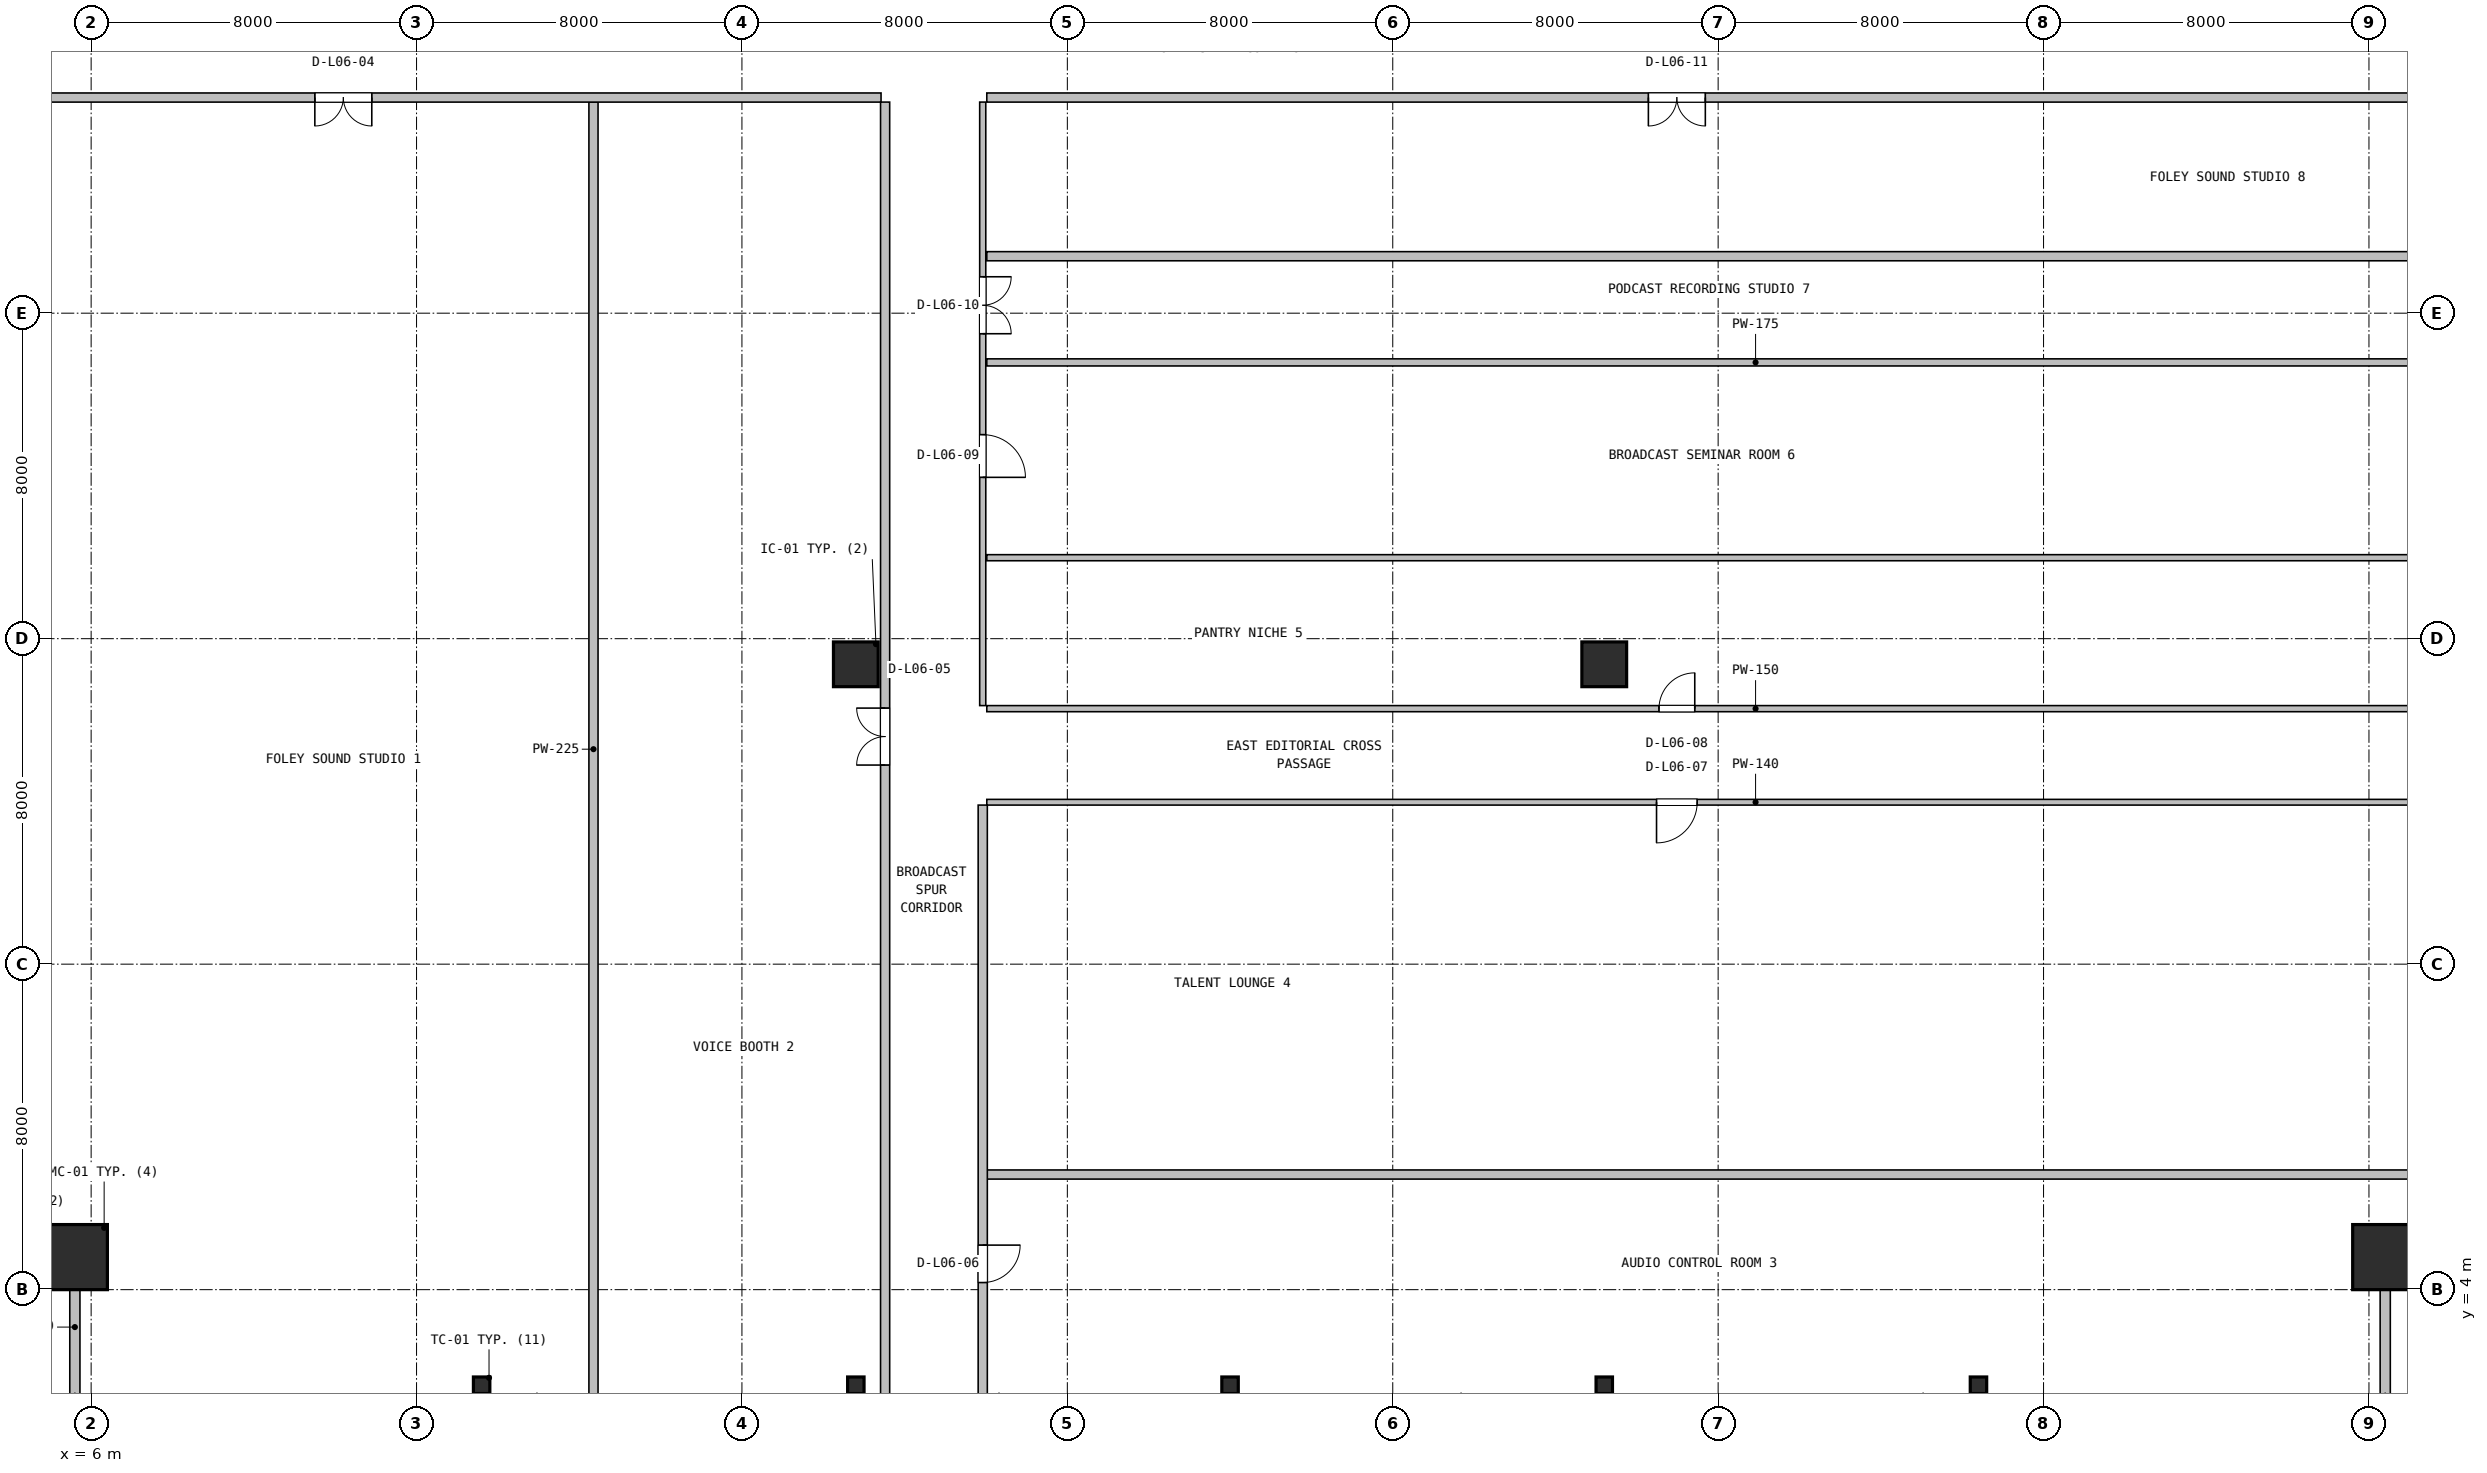
"""IFC4 building model, lengths in metres.
Left out: names, types, materials, properties, quantities, classifications, styles, units other than length and angle.
Written with IfcOpenShell. Run it as: python <this file> out.ifc"""

import sys

from ifc_helpers import new_model, si_unit, direction, frame, frame_2d, origin, origin_2d, place, context, subcontext, project, spatial, rectangle, hollow_rectangle, i_section, extrude, source, transform, mapped, element, fill, save


model = new_model("IFC4")
c1 = context("Model", 3, precision=1e-05, world=origin(), true_north=direction((0.0, 1.0)))
c2 = subcontext(c1, "Body", "Model", "MODEL_VIEW")
j1 = project(units=[si_unit("LENGTHUNIT", "METRE"), si_unit("PLANEANGLEUNIT", "RADIAN")], contexts=[c1])
p1 = place(None, origin())
s1 = spatial("IfcSite", under=j1, at=p1, CompositionType="ELEMENT")
p2 = place(p1, origin())
s2 = spatial("IfcBuilding", under=s1, at=p2, CompositionType="ELEMENT")
p3 = place(p2, frame((0.0, 0.0, 31.5)))
s3 = spatial("IfcBuildingStorey", under=s2, at=p3, CompositionType="ELEMENT", Elevation=31.5)
m1 = source(origin(), c2, "Body", "SweptSolid", [
    extrude(hollow_rectangle(XDim=1.6, YDim=1.6, WallThickness=0.06, at=origin_2d()), origin(), (0.0, 0.0, 1.0), 3.9),
])
for number, where, z_axis, x_axis in (
    (1, (5.6, 4.8, 0.0), (0.0, 0.0, 1.0), (1.0, 0.0, 0.0)),
    (2, (62.4, 4.8, 0.0), (0.0, 0.0, 1.0), (1.0, 0.0, 0.0)),
):
    element("IfcColumn", number, at=place(p3, frame(where, z_axis=z_axis, x_axis=x_axis)), inside=s3, PredefinedType="COLUMN", context=c2, shape_type="MappedRepresentation", body=[
        mapped(m1, transform((0.0, 0.0, 0.0), x_axis=(1.0, 0.0, 0.0), y_axis=(0.0, 1.0, 0.0), z_axis=(0.0, 0.0, 1.0), scale=1.0)),
    ])
m2 = source(origin(), c2, "Body", "SweptSolid", [
    extrude(i_section(OverallWidth=0.404, OverallDepth=0.407, WebThickness=0.027, FlangeThickness=0.044, FilletRadius=0.018, at=origin_2d()), origin(), (0.0, 0.0, 1.0), 3.9),
])
for number, where, z_axis, x_axis in (
    (3, (15.6, 1.65, 0.0), (0.0, 0.0, 1.0), (1.0, 0.0, 0.0)),
    (4, (24.8, 1.65, 0.0), (0.0, 0.0, 1.0), (1.0, 0.0, 0.0)),
    (5, (34.0, 1.65, 0.0), (0.0, 0.0, 1.0), (1.0, 0.0, 0.0)),
    (6, (43.2, 1.65, 0.0), (0.0, 0.0, 1.0), (1.0, 0.0, 0.0)),
    (7, (52.4, 1.65, 0.0), (0.0, 0.0, 1.0), (1.0, 0.0, 0.0)),
):
    element("IfcColumn", number, at=place(p3, frame(where, z_axis=z_axis, x_axis=x_axis)), inside=s3, PredefinedType="COLUMN", context=c2, shape_type="MappedRepresentation", body=[
        mapped(m2, transform((0.0, 0.0, 0.0), x_axis=(1.0, 0.0, 0.0), y_axis=(0.0, 1.0, 0.0), z_axis=(0.0, 0.0, 1.0), scale=1.0)),
    ])
m3 = source(origin(), c2, "Body", "SweptSolid", [
    extrude(rectangle(XDim=1.1, YDim=1.1, at=origin_2d()), origin(), (0.0, 0.0, 1.0), 3.9),
])
for number, where, z_axis, x_axis in (
    (8, (24.8, 19.37, 0.0), (0.0, 0.0, 1.0), (1.0, 0.0, 0.0)),
    (9, (43.2, 19.37, 0.0), (0.0, 0.0, 1.0), (1.0, 0.0, 0.0)),
):
    element("IfcColumn", number, at=place(p3, frame(where, z_axis=z_axis, x_axis=x_axis)), inside=s3, PredefinedType="COLUMN", context=c2, shape_type="MappedRepresentation", body=[
        mapped(m3, transform((0.0, 0.0, 0.0), x_axis=(1.0, 0.0, 0.0), y_axis=(0.0, 1.0, 0.0), z_axis=(0.0, 0.0, 1.0), scale=1.0)),
    ])
for number, where, z_axis, x_axis in (
    (10, (5.6, 1.28, 0.0), (0.0, 0.0, 1.0), (0.0, 1.0, 0.0)),
    (11, (62.4, 1.28, 0.0), (0.0, 0.0, 1.0), (0.0, 1.0, 0.0)),
):
    element("IfcWall", number, at=place(p3, frame(where, z_axis=z_axis, x_axis=x_axis)), inside=s3, PredefinedType="SOLIDWALL", context=c2, shape_type="SweptSolid", body=[
        extrude(rectangle(XDim=3.6, YDim=0.25, at=frame_2d((1.8, 0.0))), origin(), (0.0, 0.0, 1.0), 3.208),
    ])
p4 = place(p3, frame((18.35, 1.38, 0.0), z_axis=(0.0, 0.0, 1.0), x_axis=(0.0, 1.0, 0.0)))
e12 = element("IfcWall", 12, at=p4, inside=s3, PredefinedType="PARTITIONING", context=c2, shape_type="SweptSolid", body=[
    extrude(rectangle(XDim=31.808, YDim=0.225, at=frame_2d((15.904, 0.0))), origin(), (0.0, 0.0, 1.0), 3.208),
])
p5 = place(p3, frame((2.18, 33.3, 0.0), z_axis=(0.0, 0.0, 1.0), x_axis=(1.0, 0.0, 0.0)))
e13 = element("IfcWall", 13, at=p5, inside=s3, PredefinedType="PARTITIONING", context=c2, shape_type="SweptSolid", body=[
    extrude(rectangle(XDim=23.24, YDim=0.225, at=frame_2d((11.62, 0.0))), origin(), (0.0, 0.0, 1.0), 2.852),
])
p6 = place(p5, frame((9.32, 0.0, 0.0)))
e14 = element("IfcOpeningElement", 14, at=p6, cuts=e13, PredefinedType="OPENING", context=c2, shape_type="SweptSolid", body=[
    extrude(rectangle(XDim=1.4, YDim=2.12, at=frame_2d((0.7, 1.06))), frame((0.0, 0.123, 0.0), z_axis=(0.0, -1.0, 0.0), x_axis=(1.0, 0.0, 0.0)), (0.0, 0.0, 1.0), 0.245),
])
p7 = place(p3, frame((25.52, 1.38, 0.0), z_axis=(0.0, 0.0, 1.0), x_axis=(0.0, 1.0, 0.0)))
e15 = element("IfcWall", 15, at=p7, inside=s3, PredefinedType="PARTITIONING", context=c2, shape_type="SweptSolid", body=[
    extrude(rectangle(XDim=31.808, YDim=0.225, at=frame_2d((15.904, 0.0))), origin(), (0.0, 0.0, 1.0), 2.852),
])
p8 = place(p7, frame((15.514, 0.0, 0.0)))
e16 = element("IfcOpeningElement", 16, at=p8, cuts=e15, PredefinedType="OPENING", context=c2, shape_type="SweptSolid", body=[
    extrude(rectangle(XDim=1.4, YDim=2.12, at=frame_2d((0.7, 1.06))), frame((0.0, 0.123, 0.0), z_axis=(0.0, -1.0, 0.0), x_axis=(1.0, 0.0, 0.0)), (0.0, 0.0, 1.0), 0.245),
])
p9 = place(p3, frame((28.02, 6.83, 0.0), z_axis=(0.0, 0.0, 1.0), x_axis=(1.0, 0.0, 0.0)))
e17 = element("IfcWall", 17, at=p9, inside=s3, PredefinedType="PARTITIONING", context=c2, shape_type="SweptSolid", body=[
    extrude(rectangle(XDim=37.8, YDim=0.225, at=frame_2d((18.9, 0.0))), origin(), (0.0, 0.0, 1.0), 2.852),
])
p10 = place(p3, frame((27.92, 1.38, 0.0), z_axis=(0.0, 0.0, 1.0), x_axis=(0.0, 1.0, 0.0)))
e18 = element("IfcWall", 18, at=p10, inside=s3, PredefinedType="PARTITIONING", context=c2, shape_type="SweptSolid", body=[
    extrude(rectangle(XDim=14.53, YDim=0.225, at=frame_2d((7.265, 0.0))), origin(), (0.0, 0.0, 1.0), 3.208),
])
p11 = place(p10, frame((2.795, 0.0, 0.0)))
e19 = element("IfcOpeningElement", 19, at=p11, cuts=e18, PredefinedType="OPENING", context=c2, shape_type="SweptSolid", body=[
    extrude(rectangle(XDim=0.92, YDim=2.08, at=frame_2d((0.46, 1.04))), frame((0.0, 0.123, 0.0), z_axis=(0.0, -1.0, 0.0), x_axis=(1.0, 0.0, 0.0)), (0.0, 0.0, 1.0), 0.245),
])
p12 = place(p3, frame((28.02, 15.98, 0.0), z_axis=(0.0, 0.0, 1.0), x_axis=(1.0, 0.0, 0.0)))
e20 = element("IfcWall", 20, at=p12, inside=s3, PredefinedType="PARTITIONING", context=c2, shape_type="SweptSolid", body=[
    extrude(rectangle(XDim=37.8, YDim=0.14, at=frame_2d((18.9, 0.0))), origin(), (0.0, 0.0, 1.0), 2.852),
])
p13 = place(p12, frame((16.465, 0.0, 0.0)))
e21 = element("IfcOpeningElement", 21, at=p13, cuts=e20, PredefinedType="OPENING", context=c2, shape_type="SweptSolid", body=[
    extrude(rectangle(XDim=1.0, YDim=2.1, at=frame_2d((0.5, 1.05))), frame((0.0, 0.08, 0.0), z_axis=(0.0, -1.0, 0.0), x_axis=(1.0, 0.0, 0.0)), (0.0, 0.0, 1.0), 0.16),
])
p14 = place(p3, frame((28.02, 18.28, 0.0), z_axis=(0.0, 0.0, 1.0), x_axis=(1.0, 0.0, 0.0)))
e22 = element("IfcWall", 22, at=p14, inside=s3, PredefinedType="PARTITIONING", context=c2, shape_type="SweptSolid", body=[
    extrude(rectangle(XDim=37.8, YDim=0.15, at=frame_2d((18.9, 0.0))), origin(), (0.0, 0.0, 1.0), 2.852),
])
p15 = place(p14, frame((16.525, 0.0, 0.0)))
e23 = element("IfcOpeningElement", 23, at=p15, cuts=e22, PredefinedType="OPENING", context=c2, shape_type="SweptSolid", body=[
    extrude(rectangle(XDim=0.88, YDim=2.06, at=frame_2d((0.44, 1.03))), frame((0.0, 0.085, 0.0), z_axis=(0.0, -1.0, 0.0), x_axis=(1.0, 0.0, 0.0)), (0.0, 0.0, 1.0), 0.17),
])
p16 = place(p3, frame((28.02, 21.99, 0.0), z_axis=(0.0, 0.0, 1.0), x_axis=(1.0, 0.0, 0.0)))
e24 = element("IfcWall", 24, at=p16, inside=s3, PredefinedType="PARTITIONING", context=c2, shape_type="SweptSolid", body=[
    extrude(rectangle(XDim=37.8, YDim=0.15, at=frame_2d((18.9, 0.0))), origin(), (0.0, 0.0, 1.0), 2.852),
])
p17 = place(p3, frame((27.92, 18.355, 0.0), z_axis=(0.0, 0.0, 1.0), x_axis=(0.0, 1.0, 0.0)))
e25 = element("IfcWall", 25, at=p17, inside=s3, PredefinedType="PARTITIONING", context=c2, shape_type="SweptSolid", body=[
    extrude(rectangle(XDim=14.833, YDim=0.15, at=frame_2d((7.417, 0.0))), origin(), (0.0, 0.0, 1.0), 2.852),
])
p18 = place(p17, frame((5.61, 0.0, 0.0)))
e26 = element("IfcOpeningElement", 26, at=p18, cuts=e25, PredefinedType="OPENING", context=c2, shape_type="SweptSolid", body=[
    extrude(rectangle(XDim=1.05, YDim=2.1, at=frame_2d((0.525, 1.05))), frame((0.0, 0.085, 0.0), z_axis=(0.0, -1.0, 0.0), x_axis=(1.0, 0.0, 0.0)), (0.0, 0.0, 1.0), 0.17),
])
p19 = place(p17, frame((9.14, 0.0, 0.0)))
e27 = element("IfcOpeningElement", 27, at=p19, cuts=e25, PredefinedType="OPENING", context=c2, shape_type="SweptSolid", body=[
    extrude(rectangle(XDim=1.4, YDim=2.12, at=frame_2d((0.7, 1.06))), frame((0.0, 0.085, 0.0), z_axis=(0.0, -1.0, 0.0), x_axis=(1.0, 0.0, 0.0)), (0.0, 0.0, 1.0), 0.17),
])
p20 = place(p3, frame((28.02, 26.79, 0.0), z_axis=(0.0, 0.0, 1.0), x_axis=(1.0, 0.0, 0.0)))
e28 = element("IfcWall", 28, at=p20, inside=s3, PredefinedType="PARTITIONING", context=c2, shape_type="SweptSolid", body=[
    extrude(rectangle(XDim=37.8, YDim=0.175, at=frame_2d((18.9, 0.0))), origin(), (0.0, 0.0, 1.0), 2.852),
])
p21 = place(p3, frame((28.02, 29.4, 0.0), z_axis=(0.0, 0.0, 1.0), x_axis=(1.0, 0.0, 0.0)))
e29 = element("IfcWall", 29, at=p21, inside=s3, PredefinedType="PARTITIONING", context=c2, shape_type="SweptSolid", body=[
    extrude(rectangle(XDim=37.8, YDim=0.225, at=frame_2d((18.9, 0.0))), origin(), (0.0, 0.0, 1.0), 2.852),
])
p22 = place(p3, frame((28.02, 33.3, 0.0), z_axis=(0.0, 0.0, 1.0), x_axis=(1.0, 0.0, 0.0)))
e30 = element("IfcWall", 30, at=p22, inside=s3, PredefinedType="PARTITIONING", context=c2, shape_type="SweptSolid", body=[
    extrude(rectangle(XDim=37.8, YDim=0.225, at=frame_2d((18.9, 0.0))), origin(), (0.0, 0.0, 1.0), 2.852),
])
p23 = place(p22, frame((16.265, 0.0, 0.0)))
e31 = element("IfcOpeningElement", 31, at=p23, cuts=e30, PredefinedType="OPENING", context=c2, shape_type="SweptSolid", body=[
    extrude(rectangle(XDim=1.4, YDim=2.12, at=frame_2d((0.7, 1.06))), frame((0.0, 0.123, 0.0), z_axis=(0.0, -1.0, 0.0), x_axis=(1.0, 0.0, 0.0)), (0.0, 0.0, 1.0), 0.245),
])
m4 = source(origin(), c2, "Body", "SweptSolid", [
    extrude(rectangle(XDim=1.4, YDim=2.12, at=frame_2d((0.7, 1.06))), frame((0.0, 0.025, 0.0), z_axis=(0.0, -1.0, 0.0), x_axis=(1.0, 0.0, 0.0)), (0.0, 0.0, 1.0), 0.05),
])
p24 = place(p6, frame((1.4, 0.0, 0.0), z_axis=(0.0, 0.0, 1.0), x_axis=(-1.0, 0.0, 0.0)))
e32 = element("IfcDoor", 32, at=p24, inside=s3, OperationType="DOUBLE_DOOR_SINGLE_SWING", PredefinedType="DOOR", context=c2, shape_type="MappedRepresentation", body=[
    mapped(m4, transform((0.0, 0.0, 0.0), x_axis=(1.0, 0.0, 0.0), y_axis=(0.0, 1.0, 0.0), z_axis=(0.0, 0.0, 1.0), scale=1.0)),
])
fill(e14, e32)
p25 = place(p8, origin())
e33 = element("IfcDoor", 33, at=p25, inside=s3, OperationType="DOUBLE_DOOR_SINGLE_SWING", PredefinedType="DOOR", context=c2, shape_type="MappedRepresentation", body=[
    mapped(m4, transform((0.0, 0.0, 0.0), x_axis=(1.0, 0.0, 0.0), y_axis=(0.0, 1.0, 0.0), z_axis=(0.0, 0.0, 1.0), scale=1.0)),
])
fill(e16, e33)
m5 = source(origin(), c2, "Body", "SweptSolid", [
    extrude(rectangle(XDim=0.92, YDim=2.08, at=frame_2d((0.46, 1.04))), frame((0.0, 0.025, 0.0), z_axis=(0.0, -1.0, 0.0), x_axis=(1.0, 0.0, 0.0)), (0.0, 0.0, 1.0), 0.05),
])
p26 = place(p11, frame((0.92, 0.0, 0.0), z_axis=(0.0, 0.0, 1.0), x_axis=(-1.0, 0.0, 0.0)))
e34 = element("IfcDoor", 34, at=p26, inside=s3, OperationType="SINGLE_SWING_RIGHT", PredefinedType="DOOR", context=c2, shape_type="MappedRepresentation", body=[
    mapped(m5, transform((0.0, 0.0, 0.0), x_axis=(1.0, 0.0, 0.0), y_axis=(0.0, 1.0, 0.0), z_axis=(0.0, 0.0, 1.0), scale=1.0)),
])
fill(e19, e34)
m6 = source(origin(), c2, "Body", "SweptSolid", [
    extrude(rectangle(XDim=1.0, YDim=2.1, at=frame_2d((0.5, 1.05))), frame((0.0, 0.025, 0.0), z_axis=(0.0, -1.0, 0.0), x_axis=(1.0, 0.0, 0.0)), (0.0, 0.0, 1.0), 0.05),
])
p27 = place(p13, frame((1.0, 0.0, 0.0), z_axis=(0.0, 0.0, 1.0), x_axis=(-1.0, 0.0, 0.0)))
e35 = element("IfcDoor", 35, at=p27, inside=s3, OperationType="SINGLE_SWING_LEFT", PredefinedType="DOOR", context=c2, shape_type="MappedRepresentation", body=[
    mapped(m6, transform((0.0, 0.0, 0.0), x_axis=(1.0, 0.0, 0.0), y_axis=(0.0, 1.0, 0.0), z_axis=(0.0, 0.0, 1.0), scale=1.0)),
])
fill(e21, e35)
m7 = source(origin(), c2, "Body", "SweptSolid", [
    extrude(rectangle(XDim=0.88, YDim=2.06, at=frame_2d((0.44, 1.03))), frame((0.0, 0.025, 0.0), z_axis=(0.0, -1.0, 0.0), x_axis=(1.0, 0.0, 0.0)), (0.0, 0.0, 1.0), 0.05),
])
p28 = place(p15, origin())
e36 = element("IfcDoor", 36, at=p28, inside=s3, OperationType="SINGLE_SWING_RIGHT", PredefinedType="DOOR", context=c2, shape_type="MappedRepresentation", body=[
    mapped(m7, transform((0.0, 0.0, 0.0), x_axis=(1.0, 0.0, 0.0), y_axis=(0.0, 1.0, 0.0), z_axis=(0.0, 0.0, 1.0), scale=1.0)),
])
fill(e23, e36)
m8 = source(origin(), c2, "Body", "SweptSolid", [
    extrude(rectangle(XDim=1.05, YDim=2.1, at=frame_2d((0.525, 1.05))), frame((0.0, 0.025, 0.0), z_axis=(0.0, -1.0, 0.0), x_axis=(1.0, 0.0, 0.0)), (0.0, 0.0, 1.0), 0.05),
])
p29 = place(p18, frame((1.05, 0.0, 0.0), z_axis=(0.0, 0.0, 1.0), x_axis=(-1.0, 0.0, 0.0)))
e37 = element("IfcDoor", 37, at=p29, inside=s3, OperationType="SINGLE_SWING_LEFT", PredefinedType="DOOR", context=c2, shape_type="MappedRepresentation", body=[
    mapped(m8, transform((0.0, 0.0, 0.0), x_axis=(1.0, 0.0, 0.0), y_axis=(0.0, 1.0, 0.0), z_axis=(0.0, 0.0, 1.0), scale=1.0)),
])
fill(e26, e37)
p30 = place(p19, frame((1.4, 0.0, 0.0), z_axis=(0.0, 0.0, 1.0), x_axis=(-1.0, 0.0, 0.0)))
e38 = element("IfcDoor", 38, at=p30, inside=s3, OperationType="DOUBLE_DOOR_SINGLE_SWING", PredefinedType="DOOR", context=c2, shape_type="MappedRepresentation", body=[
    mapped(m4, transform((0.0, 0.0, 0.0), x_axis=(1.0, 0.0, 0.0), y_axis=(0.0, 1.0, 0.0), z_axis=(0.0, 0.0, 1.0), scale=1.0)),
])
fill(e27, e38)
p31 = place(p23, frame((1.4, 0.0, 0.0), z_axis=(0.0, 0.0, 1.0), x_axis=(-1.0, 0.0, 0.0)))
e39 = element("IfcDoor", 39, at=p31, inside=s3, OperationType="DOUBLE_DOOR_SINGLE_SWING", PredefinedType="DOOR", context=c2, shape_type="MappedRepresentation", body=[
    mapped(m4, transform((0.0, 0.0, 0.0), x_axis=(1.0, 0.0, 0.0), y_axis=(0.0, 1.0, 0.0), z_axis=(0.0, 0.0, 1.0), scale=1.0)),
])
fill(e31, e39)
save(model, sys.argv[1])
